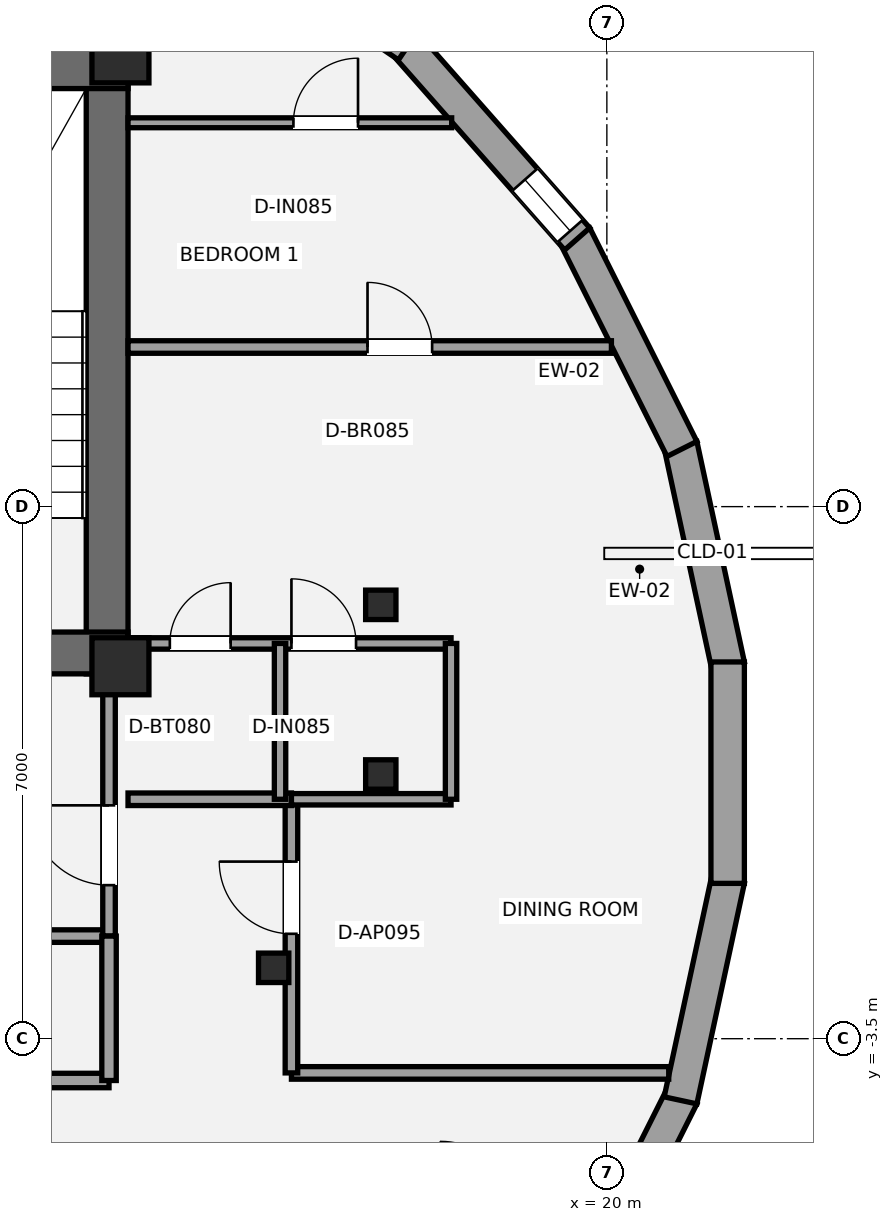
"""IFC4 building model, lengths in metres.
Left out: names, types, materials, properties, quantities, classifications, styles, units other than length and angle.
Written with IfcOpenShell. Run it as: python <this file> out.ifc"""

import sys

from ifc_helpers import new_model, si_unit, direction, frame, frame_2d, origin, origin_2d, place, context, subcontext, project, spatial, rectangle, i_section, extrude, element, fill, save


model = new_model("IFC4")
c1 = context("Model", 3, precision=1e-05, world=origin(), true_north=direction((0.0, 1.0)))
c2 = subcontext(c1, "Body", "Model", "MODEL_VIEW")
j1 = project(units=[si_unit("LENGTHUNIT", "METRE"), si_unit("PLANEANGLEUNIT", "RADIAN")], contexts=[c1])
p1 = place(None, origin())
s1 = spatial("IfcSite", under=j1, at=p1, CompositionType="ELEMENT")
p2 = place(p1, origin())
s2 = spatial("IfcBuilding", under=s1, at=p2, CompositionType="ELEMENT")
p3 = place(p2, frame((0.0, 0.0, 238.35)))
s3 = spatial("IfcBuildingStorey", under=s2, at=p3, CompositionType="ELEMENT", Elevation=238.35)
p4 = place(p3, frame((13.425, 1.3, 0.0), z_axis=(0.0, 0.0, 1.0), x_axis=(0.0, 1.0, 0.0)))
e1 = element("IfcWall", 1, at=p4, inside=s3, PredefinedType="SHEAR", context=c2, shape_type="SweptSolid", body=[
    extrude(rectangle(XDim=8.25, YDim=0.55, at=frame_2d((4.125, 0.0))), origin(), (0.0, 0.0, 1.0), 3.15),
])
p5 = place(p3, frame((4.525, 9.275, 0.0), z_axis=(0.0, 0.0, 1.0), x_axis=(1.0, 0.0, 0.0)))
e2 = element("IfcWall", 2, at=p5, inside=s3, PredefinedType="SHEAR", context=c2, shape_type="SweptSolid", body=[
    extrude(rectangle(XDim=9.175, YDim=0.55, at=frame_2d((4.587, 0.0))), origin(), (0.0, 0.0, 1.0), 3.15),
])
p6 = place(p3, frame((13.7, 1.575, 0.0), z_axis=(0.0, 0.0, 1.0), x_axis=(-1.0, 0.0, 0.0)))
e3 = element("IfcWall", 3, at=p6, inside=s3, PredefinedType="SHEAR", context=c2, shape_type="SweptSolid", body=[
    extrude(rectangle(XDim=8.775, YDim=0.55, at=frame_2d((4.387, 0.0))), origin(), (0.0, 0.0, 1.0), 3.15),
])
p7 = place(p6, frame((2.35, 0.0, 0.0)))
e4 = element("IfcOpeningElement", 4, at=p7, cuts=e3, PredefinedType="OPENING", context=c2, shape_type="SweptSolid", body=[
    extrude(rectangle(XDim=1.05, YDim=2.15, at=frame_2d((0.525, 1.075))), frame((0.0, 0.285, 0.0), z_axis=(0.0, -1.0, 0.0), x_axis=(1.0, 0.0, 0.0)), (0.0, 0.0, 1.0), 0.57),
])
p8 = place(p6, frame((4.35, 0.0, 0.0)))
e5 = element("IfcOpeningElement", 5, at=p8, cuts=e3, PredefinedType="OPENING", context=c2, shape_type="SweptSolid", body=[
    extrude(rectangle(XDim=1.1, YDim=2.2, at=frame_2d((0.55, 1.1))), frame((0.0, 0.285, 0.0), z_axis=(0.0, -1.0, 0.0), x_axis=(1.0, 0.0, 0.0)), (0.0, 0.0, 1.0), 0.57),
])
for number, where, z_axis, x_axis in (
    (6, (13.6, 1.4, 0.0), (0.0, 0.0, 1.0), (1.0, 0.0, 0.0)),
    (7, (13.6, 9.45, 0.0), (0.0, 0.0, 1.0), (1.0, 0.0, 0.0)),
):
    element("IfcColumn", number, at=place(p3, frame(where, z_axis=z_axis, x_axis=x_axis)), inside=s3, PredefinedType="PILASTER", context=c2, shape_type="SweptSolid", body=[
        extrude(rectangle(XDim=0.75, YDim=0.75, at=origin_2d()), origin(), (0.0, 0.0, 1.0), 3.15),
    ])
for number, where, z_axis, x_axis in (
    (8, (17.026, 2.208, 0.0), (0.0, 0.0, 1.0), (1.0, 0.0, 0.0)),
    (9, (15.616, -2.567, 0.0), (0.0, 0.0, 1.0), (1.0, 0.0, 0.0)),
    (10, (17.026, -0.024, 0.0), (0.0, 0.0, 1.0), (1.0, 0.0, 0.0)),
):
    element("IfcColumn", number, at=place(p3, frame(where, z_axis=z_axis, x_axis=x_axis)), inside=s3, PredefinedType="COLUMN", context=c2, shape_type="SweptSolid", body=[
        extrude(i_section(OverallWidth=0.399, OverallDepth=0.387, WebThickness=0.021, FlangeThickness=0.033, at=origin_2d()), origin(), (0.0, 0.0, 1.0), 3.15),
    ])
p9 = place(p3, frame((20.969, 4.311, 0.0), z_axis=(0.0, 0.0, 1.0), x_axis=(0.210540350534, -0.977585168053, 0.0)))
e11 = element("IfcWall", 11, at=p9, inside=s3, PredefinedType="STANDARD", context=c2, shape_type="SweptSolid", body=[
    extrude(rectangle(XDim=2.967, YDim=0.44, at=frame_2d((1.484, 0.0))), origin(), (0.0, 0.0, 1.0), 2.336),
])
p10 = place(p3, frame((19.578, 7.069, 0.0), z_axis=(0.0, 0.0, 1.0), x_axis=(0.448424724145, -0.893820601002, 0.0)))
e12 = element("IfcWall", 12, at=p10, inside=s3, PredefinedType="STANDARD", context=c2, shape_type="SweptSolid", body=[
    extrude(rectangle(XDim=3.144, YDim=0.44, at=frame_2d((1.572, 0.0))), origin(), (0.0, 0.0, 1.0), 2.336),
])
p11 = place(p3, frame((17.34, 9.596, 0.0), z_axis=(0.0, 0.0, 1.0), x_axis=(0.66136043846, -0.750068243855, 0.0)))
e13 = element("IfcWall", 13, at=p11, inside=s3, PredefinedType="STANDARD", context=c2, shape_type="SweptSolid", body=[
    extrude(rectangle(XDim=3.432, YDim=0.44, at=frame_2d((1.716, 0.0))), origin(), (0.0, 0.0, 1.0), 2.336),
])
p12 = place(p11, frame((2.392, 0.0, 0.88)))
e14 = element("IfcOpeningElement", 14, at=p12, cuts=e13, PredefinedType="OPENING", context=c2, shape_type="SweptSolid", body=[
    extrude(rectangle(XDim=0.9, YDim=1.35, at=frame_2d((0.45, 0.675))), frame((0.0, 0.23, 0.0), z_axis=(0.0, -1.0, 0.0), x_axis=(1.0, 0.0, 0.0)), (0.0, 0.0, 1.0), 0.46),
])
p13 = place(p3, frame((14.242, 11.688, 0.0), z_axis=(0.0, 0.0, 1.0), x_axis=(0.827637036896, -0.561263694851, 0.0)))
e15 = element("IfcWall", 15, at=p13, inside=s3, PredefinedType="STANDARD", context=c2, shape_type="SweptSolid", body=[
    extrude(rectangle(XDim=3.793, YDim=0.44, at=frame_2d((1.896, 0.0))), origin(), (0.0, 0.0, 1.0), 2.336),
])
p14 = place(p13, frame((2.693, 0.0, 0.58)))
e16 = element("IfcOpeningElement", 16, at=p14, cuts=e15, PredefinedType="OPENING", context=c2, shape_type="SweptSolid", body=[
    extrude(rectangle(XDim=0.9, YDim=1.35, at=frame_2d((0.45, 0.675))), frame((0.0, 0.23, 0.0), z_axis=(0.0, -1.0, 0.0), x_axis=(1.0, 0.0, 0.0)), (0.0, 0.0, 1.0), 0.46),
])
p15 = place(p3, frame((20.988, -4.259, 0.0), z_axis=(0.0, 0.0, 1.0), x_axis=(-0.448424724145, -0.893820601002, 0.0)))
e17 = element("IfcWall", 17, at=p15, inside=s3, PredefinedType="STANDARD", context=c2, shape_type="SweptSolid", body=[
    extrude(rectangle(XDim=3.144, YDim=0.44, at=frame_2d((1.572, 0.0))), origin(), (0.0, 0.0, 1.0), 2.336),
])
p16 = place(p3, frame((21.594, -1.41, 0.0), z_axis=(0.0, 0.0, 1.0), x_axis=(-0.210540350534, -0.977585168053, 0.0)))
e18 = element("IfcWall", 18, at=p16, inside=s3, PredefinedType="STANDARD", context=c2, shape_type="SweptSolid", body=[
    extrude(rectangle(XDim=2.967, YDim=0.44, at=frame_2d((1.484, 0.0))), origin(), (0.0, 0.0, 1.0), 2.336),
])
p17 = place(p3, frame((21.589, 1.457, 0.0), z_axis=(0.0, 0.0, 1.0), x_axis=(0.0, -1.0, 0.0)))
e19 = element("IfcWall", 19, at=p17, inside=s3, PredefinedType="STANDARD", context=c2, shape_type="SweptSolid", body=[
    extrude(rectangle(XDim=2.913, YDim=0.44, at=frame_2d((1.457, 0.0))), origin(), (0.0, 0.0, 1.0), 2.336),
])
p18 = place(p3, frame((7.2, -2.15, 0.0), z_axis=(0.0, 0.0, 1.0), x_axis=(1.0, 0.0, 0.0)))
e20 = element("IfcWall", 20, at=p18, inside=s3, PredefinedType="PARTITIONING", context=c2, shape_type="SweptSolid", body=[
    extrude(rectangle(XDim=6.25, YDim=0.165, at=frame_2d((3.125, 0.0))), origin(), (0.0, 0.0, 1.0), 2.97),
])
p19 = place(p3, frame((13.45, -2.15, 0.0), z_axis=(0.0, 0.0, 1.0), x_axis=(0.0, 1.0, 0.0)))
e21 = element("IfcWall", 21, at=p19, inside=s3, PredefinedType="PARTITIONING", context=c2, shape_type="SweptSolid", body=[
    extrude(rectangle(XDim=3.5, YDim=0.165, at=frame_2d((1.75, 0.0))), origin(), (0.0, 0.0, 1.0), 2.423),
])
p20 = place(p19, frame((0.67, 0.0, 0.0)))
e22 = element("IfcOpeningElement", 22, at=p20, cuts=e21, PredefinedType="OPENING", context=c2, shape_type="SweptSolid", body=[
    extrude(rectangle(XDim=1.05, YDim=2.15, at=frame_2d((0.525, 1.075))), frame((0.0, 0.093, 0.0), z_axis=(0.0, -1.0, 0.0), x_axis=(1.0, 0.0, 0.0)), (0.0, 0.0, 1.0), 0.185),
])
p21 = place(p3, frame((2.1, -4.05, 0.0), z_axis=(0.0, 0.0, 1.0), x_axis=(1.0, 0.0, 0.0)))
e23 = element("IfcWall", 23, at=p21, inside=s3, PredefinedType="PLUMBINGWALL", context=c2, shape_type="SweptSolid", body=[
    extrude(rectangle(XDim=11.35, YDim=0.19, at=frame_2d((5.675, 0.0))), origin(), (0.0, 0.0, 1.0), 2.357),
])
p22 = place(p21, frame((1.4, 0.0, 0.0)))
e24 = element("IfcOpeningElement", 24, at=p22, cuts=e23, PredefinedType="OPENING", context=c2, shape_type="SweptSolid", body=[
    extrude(rectangle(XDim=0.9, YDim=2.1, at=frame_2d((0.45, 1.05))), frame((0.0, 0.105, 0.0), z_axis=(0.0, -1.0, 0.0), x_axis=(1.0, 0.0, 0.0)), (0.0, 0.0, 1.0), 0.21),
])
p23 = place(p21, frame((5.3, 0.0, 0.0)))
e25 = element("IfcOpeningElement", 25, at=p23, cuts=e23, PredefinedType="OPENING", context=c2, shape_type="SweptSolid", body=[
    extrude(rectangle(XDim=0.9, YDim=2.1, at=frame_2d((0.45, 1.05))), frame((0.0, 0.105, 0.0), z_axis=(0.0, -1.0, 0.0), x_axis=(1.0, 0.0, 0.0)), (0.0, 0.0, 1.0), 0.21),
])
p24 = place(p21, frame((9.1, 0.0, 0.0)))
e26 = element("IfcOpeningElement", 26, at=p24, cuts=e23, PredefinedType="OPENING", context=c2, shape_type="SweptSolid", body=[
    extrude(rectangle(XDim=0.9, YDim=2.1, at=frame_2d((0.45, 1.05))), frame((0.0, 0.105, 0.0), z_axis=(0.0, -1.0, 0.0), x_axis=(1.0, 0.0, 0.0)), (0.0, 0.0, 1.0), 0.21),
])
p25 = place(p3, frame((13.45, -4.05, 0.0), z_axis=(0.0, 0.0, 1.0), x_axis=(0.0, 1.0, 0.0)))
e27 = element("IfcWall", 27, at=p25, inside=s3, PredefinedType="PLUMBINGWALL", context=c2, shape_type="SweptSolid", body=[
    extrude(rectangle(XDim=1.9, YDim=0.19, at=frame_2d((0.95, 0.0))), origin(), (0.0, 0.0, 1.0), 2.423),
])
p26 = place(p3, frame((15.85, -3.95, 0.0), z_axis=(0.0, 0.0, 1.0), x_axis=(1.0, 0.0, 0.0)))
e28 = element("IfcWall", 28, at=p26, inside=s3, PredefinedType="PARTITIONING", context=c2, shape_type="SweptSolid", body=[
    extrude(rectangle(XDim=4.964, YDim=0.165, at=frame_2d((2.482, 0.0))), origin(), (0.0, 0.0, 1.0), 2.423),
])
p27 = place(p3, frame((15.85, -3.95, 0.0), z_axis=(0.0, 0.0, 1.0), x_axis=(0.0, 1.0, 0.0)))
e29 = element("IfcWall", 29, at=p27, inside=s3, PredefinedType="PARTITIONING", context=c2, shape_type="SweptSolid", body=[
    extrude(rectangle(XDim=3.6, YDim=0.165, at=frame_2d((1.8, 0.0))), origin(), (0.0, 0.0, 1.0), 2.357),
])
p28 = place(p27, frame((1.83, 0.0, 0.0)))
e30 = element("IfcOpeningElement", 30, at=p28, cuts=e29, PredefinedType="OPENING", context=c2, shape_type="SweptSolid", body=[
    extrude(rectangle(XDim=0.95, YDim=2.15, at=frame_2d((0.475, 1.075))), frame((0.0, 0.093, 0.0), z_axis=(0.0, -1.0, 0.0), x_axis=(1.0, 0.0, 0.0)), (0.0, 0.0, 1.0), 0.185),
])
p29 = place(p3, frame((13.7, -0.35, 0.0), z_axis=(0.0, 0.0, 1.0), x_axis=(1.0, 0.0, 0.0)))
e31 = element("IfcWall", 31, at=p29, inside=s3, PredefinedType="PARTITIONING", context=c2, shape_type="SweptSolid", body=[
    extrude(rectangle(XDim=2.15, YDim=0.165, at=frame_2d((1.075, 0.0))), origin(), (0.0, 0.0, 1.0), 2.423),
])
p30 = place(p3, frame((13.7, 5.6, 0.0), z_axis=(0.0, 0.0, 1.0), x_axis=(1.0, 0.0, 0.0)))
e32 = element("IfcWall", 32, at=p30, inside=s3, PredefinedType="PARTITIONING", context=c2, shape_type="SweptSolid", body=[
    extrude(rectangle(XDim=6.36, YDim=0.165, at=frame_2d((3.18, 0.0))), origin(), (0.0, 0.0, 1.0), 2.423),
])
p31 = place(p30, frame((3.151, 0.0, 0.0)))
e33 = element("IfcOpeningElement", 33, at=p31, cuts=e32, PredefinedType="OPENING", context=c2, shape_type="SweptSolid", body=[
    extrude(rectangle(XDim=0.85, YDim=2.1, at=frame_2d((0.425, 1.05))), frame((0.0, 0.093, 0.0), z_axis=(0.0, -1.0, 0.0), x_axis=(1.0, 0.0, 0.0)), (0.0, 0.0, 1.0), 0.185),
])
p32 = place(p3, frame((13.7, 1.7, 0.0), z_axis=(0.0, 0.0, 1.0), x_axis=(1.0, 0.0, 0.0)))
e34 = element("IfcWall", 34, at=p32, inside=s3, PredefinedType="PLUMBINGWALL", context=c2, shape_type="SweptSolid", body=[
    extrude(rectangle(XDim=4.25, YDim=0.15, at=frame_2d((2.125, 0.0))), origin(), (0.0, 0.0, 1.0), 2.423),
])
p33 = place(p32, frame((0.55, 0.0, 0.0)))
e35 = element("IfcOpeningElement", 35, at=p33, cuts=e34, PredefinedType="OPENING", context=c2, shape_type="SweptSolid", body=[
    extrude(rectangle(XDim=0.8, YDim=2.1, at=frame_2d((0.4, 1.05))), frame((0.0, 0.085, 0.0), z_axis=(0.0, -1.0, 0.0), x_axis=(1.0, 0.0, 0.0)), (0.0, 0.0, 1.0), 0.17),
])
p34 = place(p32, frame((2.15, 0.0, 0.0)))
e36 = element("IfcOpeningElement", 36, at=p34, cuts=e34, PredefinedType="OPENING", context=c2, shape_type="SweptSolid", body=[
    extrude(rectangle(XDim=0.85, YDim=2.1, at=frame_2d((0.425, 1.05))), frame((0.0, 0.085, 0.0), z_axis=(0.0, -1.0, 0.0), x_axis=(1.0, 0.0, 0.0)), (0.0, 0.0, 1.0), 0.17),
])
p35 = place(p3, frame((15.85, -0.35, 0.0), z_axis=(0.0, 0.0, 1.0), x_axis=(1.0, 0.0, 0.0)))
e37 = element("IfcWall", 37, at=p35, inside=s3, PredefinedType="PLUMBINGWALL", context=c2, shape_type="SweptSolid", body=[
    extrude(rectangle(XDim=2.1, YDim=0.15, at=frame_2d((1.05, 0.0))), origin(), (0.0, 0.0, 1.0), 2.423),
])
for number, where, z_axis, x_axis in (
    (38, (15.7, -0.35, 0.0), (0.0, 0.0, 1.0), (0.0, 1.0, 0.0)),
    (39, (17.95, -0.35, 0.0), (0.0, 0.0, 1.0), (0.0, 1.0, 0.0)),
):
    element("IfcWall", number, at=place(p3, frame(where, z_axis=z_axis, x_axis=x_axis)), inside=s3, PredefinedType="PLUMBINGWALL", context=c2, shape_type="SweptSolid", body=[
        extrude(rectangle(XDim=2.05, YDim=0.15, at=frame_2d((1.025, 0.0))), origin(), (0.0, 0.0, 1.0), 2.97),
    ])
p36 = place(p3, frame((13.7, 8.55, 0.0), z_axis=(0.0, 0.0, 1.0), x_axis=(1.0, 0.0, 0.0)))
e40 = element("IfcWall", 40, at=p36, inside=s3, PredefinedType="PARTITIONING", context=c2, shape_type="SweptSolid", body=[
    extrude(rectangle(XDim=4.258, YDim=0.13, at=frame_2d((2.129, 0.0))), origin(), (0.0, 0.0, 1.0), 2.423),
])
p37 = place(p36, frame((2.176, 0.0, 0.0)))
e41 = element("IfcOpeningElement", 41, at=p37, cuts=e40, PredefinedType="OPENING", context=c2, shape_type="SweptSolid", body=[
    extrude(rectangle(XDim=0.85, YDim=2.1, at=frame_2d((0.425, 1.05))), frame((0.0, 0.075, 0.0), z_axis=(0.0, -1.0, 0.0), x_axis=(1.0, 0.0, 0.0)), (0.0, 0.0, 1.0), 0.15),
])
p38 = place(p12, origin())
e42 = element("IfcWindow", 42, at=p38, inside=s3, PartitioningType="SINGLE_PANEL", PredefinedType="WINDOW", context=c2, shape_type="SweptSolid", body=[
    extrude(rectangle(XDim=0.9, YDim=1.35, at=frame_2d((0.45, 0.675))), frame((0.0, -0.01, 0.0), z_axis=(0.0, -1.0, 0.0), x_axis=(1.0, 0.0, 0.0)), (0.0, 0.0, 1.0), 0.06),
])
fill(e14, e42)
p39 = place(p20, origin())
e43 = element("IfcDoor", 43, at=p39, inside=s3, OperationType="SINGLE_SWING_RIGHT", PredefinedType="DOOR", context=c2, shape_type="SweptSolid", body=[
    extrude(rectangle(XDim=1.05, YDim=2.15, at=frame_2d((0.525, 1.075))), frame((0.0, 0.025, 0.0), z_axis=(0.0, -1.0, 0.0), x_axis=(1.0, 0.0, 0.0)), (0.0, 0.0, 1.0), 0.05),
])
fill(e22, e43)
p40 = place(p28, origin())
e44 = element("IfcDoor", 44, at=p40, inside=s3, OperationType="SINGLE_SWING_RIGHT", PredefinedType="DOOR", context=c2, shape_type="SweptSolid", body=[
    extrude(rectangle(XDim=0.95, YDim=2.15, at=frame_2d((0.475, 1.075))), frame((0.0, 0.025, 0.0), z_axis=(0.0, -1.0, 0.0), x_axis=(1.0, 0.0, 0.0)), (0.0, 0.0, 1.0), 0.05),
])
fill(e30, e44)
p41 = place(p33, origin())
e45 = element("IfcDoor", 45, at=p41, inside=s3, OperationType="SINGLE_SWING_RIGHT", PredefinedType="DOOR", context=c2, shape_type="SweptSolid", body=[
    extrude(rectangle(XDim=0.8, YDim=2.1, at=frame_2d((0.4, 1.05))), frame((0.0, 0.025, 0.0), z_axis=(0.0, -1.0, 0.0), x_axis=(1.0, 0.0, 0.0)), (0.0, 0.0, 1.0), 0.05),
])
fill(e35, e45)
p42 = place(p34, origin())
e46 = element("IfcDoor", 46, at=p42, inside=s3, OperationType="SINGLE_SWING_LEFT", PredefinedType="DOOR", context=c2, shape_type="SweptSolid", body=[
    extrude(rectangle(XDim=0.85, YDim=2.1, at=frame_2d((0.425, 1.05))), frame((0.0, 0.025, 0.0), z_axis=(0.0, -1.0, 0.0), x_axis=(1.0, 0.0, 0.0)), (0.0, 0.0, 1.0), 0.05),
])
fill(e36, e46)
p43 = place(p31, origin())
e47 = element("IfcDoor", 47, at=p43, inside=s3, OperationType="SINGLE_SWING_LEFT", PredefinedType="DOOR", context=c2, shape_type="SweptSolid", body=[
    extrude(rectangle(XDim=0.85, YDim=2.1, at=frame_2d((0.425, 1.05))), frame((0.0, 0.025, 0.0), z_axis=(0.0, -1.0, 0.0), x_axis=(1.0, 0.0, 0.0)), (0.0, 0.0, 1.0), 0.05),
])
fill(e33, e47)
p44 = place(p37, origin())
e48 = element("IfcDoor", 48, at=p44, inside=s3, OperationType="SINGLE_SWING_RIGHT", PredefinedType="DOOR", context=c2, shape_type="SweptSolid", body=[
    extrude(rectangle(XDim=0.85, YDim=2.1, at=frame_2d((0.425, 1.05))), frame((0.0, 0.025, 0.0), z_axis=(0.0, -1.0, 0.0), x_axis=(1.0, 0.0, 0.0)), (0.0, 0.0, 1.0), 0.05),
])
fill(e41, e48)
save(model, sys.argv[1])
